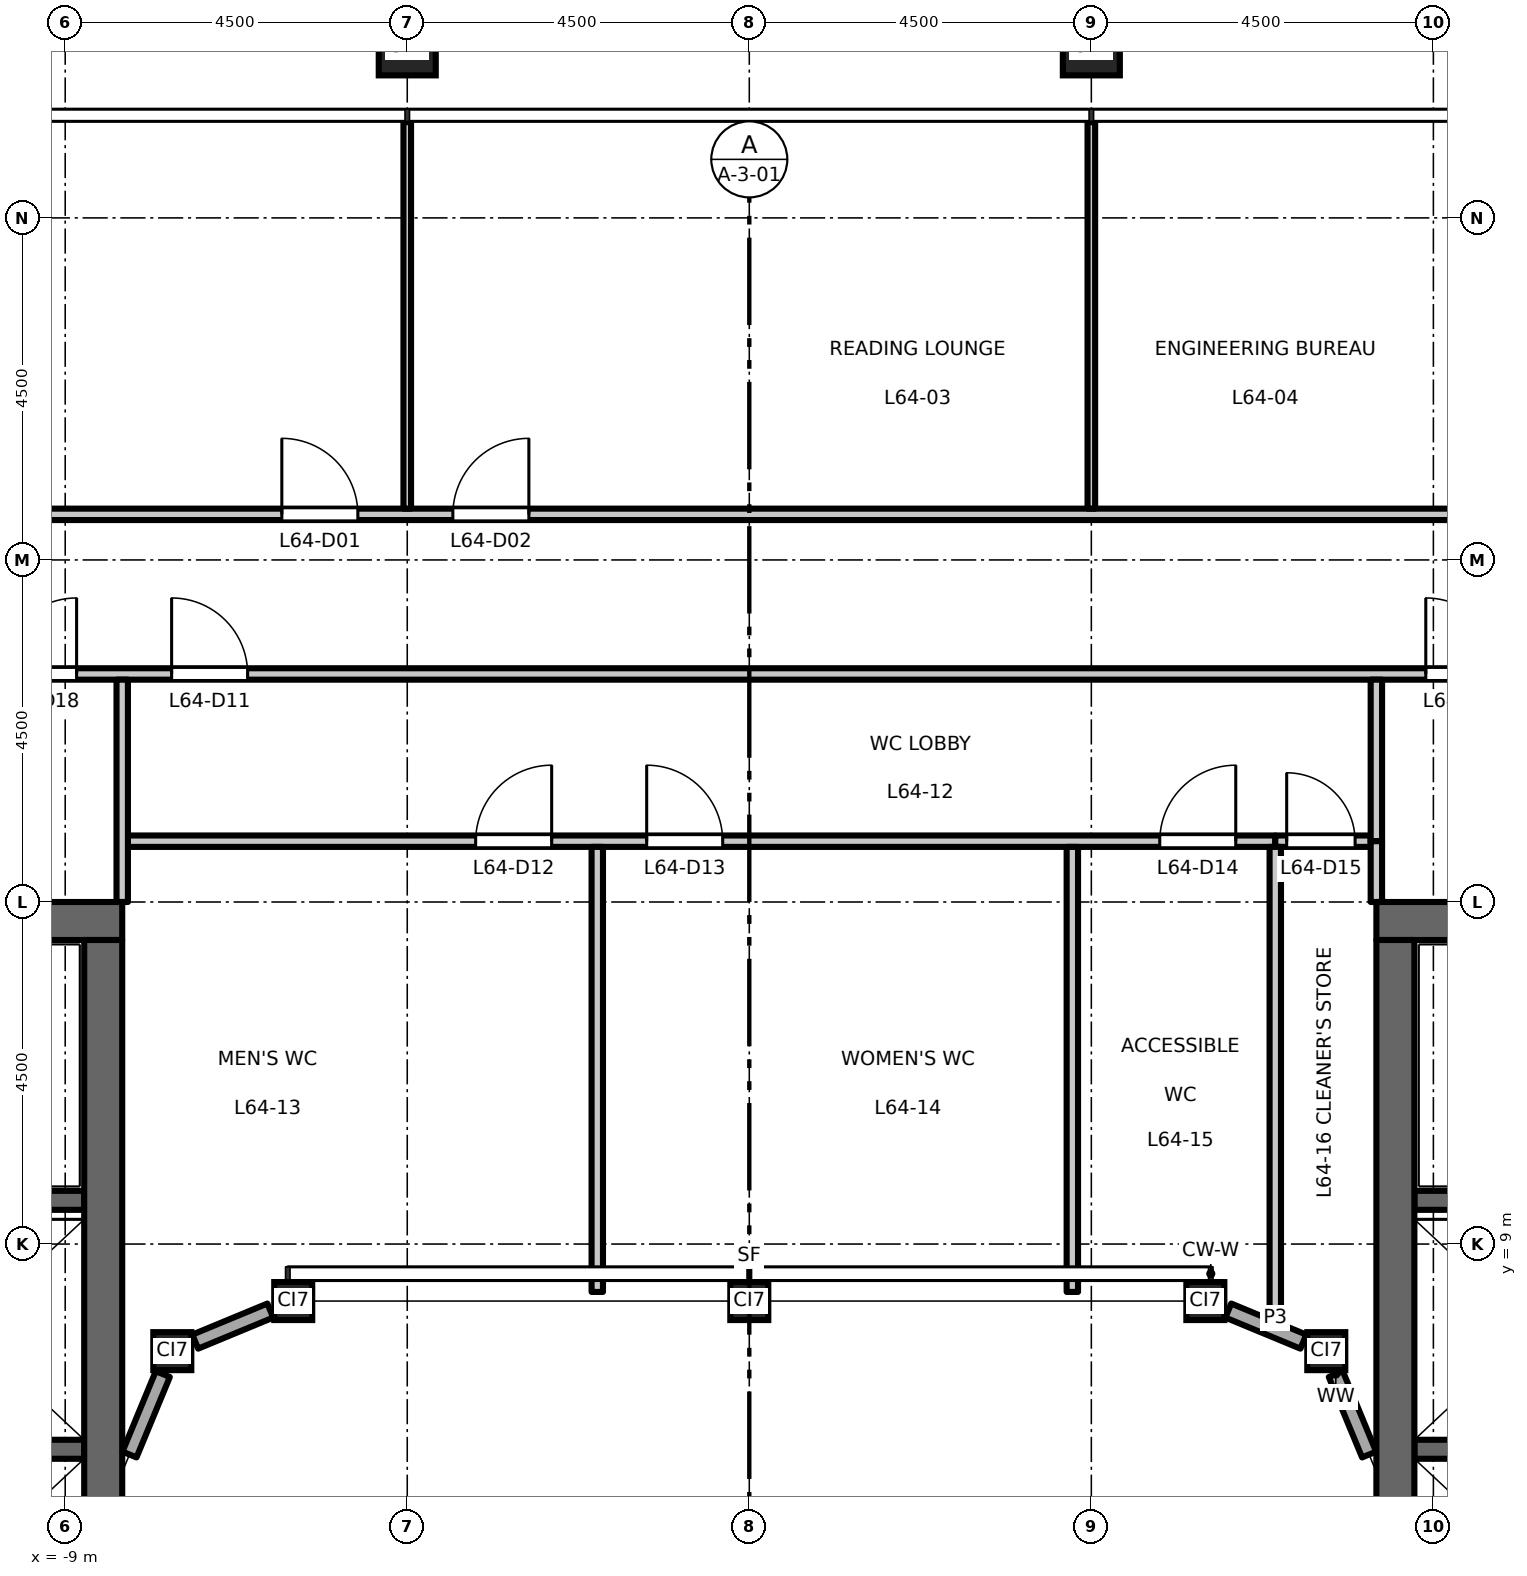
"""IFC4 building model, lengths in metres.
Left out: names, types, materials, properties, quantities, classifications, styles, units other than length and angle.
Written with IfcOpenShell. Run it as: python <this file> out.ifc"""

import sys

from ifc_helpers import new_model, si_unit, direction, frame, frame_2d, origin, origin_2d, place, context, subcontext, project, spatial, rectangle, hollow_rectangle, extrude, element, fill, save


model = new_model("IFC4")
c1 = context("Model", 3, precision=1e-05, world=origin(), true_north=direction((0.0, 1.0)))
c2 = subcontext(c1, "Body", "Model", "MODEL_VIEW")
j1 = project(units=[si_unit("LENGTHUNIT", "METRE"), si_unit("PLANEANGLEUNIT", "RADIAN")], contexts=[c1])
p1 = place(None, origin())
s1 = spatial("IfcSite", under=j1, at=p1, CompositionType="ELEMENT")
p2 = place(p1, origin())
s2 = spatial("IfcBuilding", under=s1, at=p2, CompositionType="ELEMENT")
p3 = place(p2, frame((0.0, 0.0, 298.7)))
s3 = spatial("IfcBuildingStorey", under=s2, at=p3, CompositionType="ELEMENT", Elevation=298.7)
for number, where, z_axis, x_axis in (
    (1, (4.5, 24.75, 0.0), (0.0, 0.0, 1.0), (1.0, 0.0, 0.0)),
    (2, (-4.5, 24.75, 0.0), (0.0, 0.0, 1.0), (1.0, 0.0, 0.0)),
):
    element("IfcColumn", number, at=place(p3, frame(where, z_axis=z_axis, x_axis=x_axis)), inside=s3, PredefinedType="COLUMN", context=c2, shape_type="SweptSolid", body=[
        extrude(hollow_rectangle(XDim=0.75, YDim=0.75, WallThickness=0.04, at=origin_2d()), origin(), (0.0, 0.0, 1.0), 4.5),
    ])
for number, where, z_axis, x_axis in (
    (3, (-7.591, 7.591, 0.0), (0.0, 0.0, 1.0), (1.0, 0.0, 0.0)),
    (4, (-6.0, 8.25, 0.0), (0.0, 0.0, 1.0), (1.0, 0.0, 0.0)),
    (5, (0.0, 8.25, 0.0), (0.0, 0.0, 1.0), (1.0, 0.0, 0.0)),
    (6, (6.0, 8.25, 0.0), (0.0, 0.0, 1.0), (1.0, 0.0, 0.0)),
    (7, (7.591, 7.591, 0.0), (0.0, 0.0, 1.0), (1.0, 0.0, 0.0)),
):
    element("IfcColumn", number, at=place(p3, frame(where, z_axis=z_axis, x_axis=x_axis)), inside=s3, PredefinedType="COLUMN", context=c2, shape_type="SweptSolid", body=[
        extrude(hollow_rectangle(XDim=0.5, YDim=0.5, WallThickness=0.025, at=origin_2d()), origin(), (0.0, 0.0, 1.0), 4.5),
    ])
p4 = place(p3, frame((-8.75, 6.3, 0.0), z_axis=(0.0, 0.0, 1.0), x_axis=(-1.0, 0.0, 0.0)))
e8 = element("IfcWall", 8, at=p4, inside=s3, PredefinedType="SHEAR", context=c2, shape_type="SweptSolid", body=[
    extrude(rectangle(XDim=3.1, YDim=0.25, at=frame_2d((1.55, 0.0))), origin(), (0.0, 0.0, 1.0), 4.35),
])
p5 = place(p3, frame((-8.75, 9.575, 0.0), z_axis=(0.0, 0.0, 1.0), x_axis=(-1.0, 0.0, 0.0)))
e9 = element("IfcWall", 9, at=p5, inside=s3, PredefinedType="SHEAR", context=c2, shape_type="SweptSolid", body=[
    extrude(rectangle(XDim=8.0, YDim=0.25, at=frame_2d((4.0, 0.0))), origin(), (0.0, 0.0, 1.0), 4.35),
])
p6 = place(p5, frame((6.65, 0.0, 0.0)))
e10 = element("IfcOpeningElement", 10, at=p6, cuts=e9, PredefinedType="OPENING", context=c2, shape_type="SweptSolid", body=[
    extrude(rectangle(XDim=1.1, YDim=2.1, at=frame_2d((0.55, 1.05))), frame((0.0, 0.135, 0.0), z_axis=(0.0, -1.0, 0.0), x_axis=(1.0, 0.0, 0.0)), (0.0, 0.0, 1.0), 0.27),
])
p7 = place(p3, frame((-8.25, 13.25, 0.0), z_axis=(0.0, 0.0, 1.0), x_axis=(-1.0, 0.0, 0.0)))
e11 = element("IfcWall", 11, at=p7, inside=s3, PredefinedType="SHEAR", context=c2, shape_type="SweptSolid", body=[
    extrude(rectangle(XDim=9.0, YDim=0.5, at=frame_2d((4.5, 0.0))), origin(), (0.0, 0.0, 1.0), 4.35),
])
p8 = place(p3, frame((-8.5, -13.0, 0.0), z_axis=(0.0, 0.0, 1.0), x_axis=(0.0, 1.0, 0.0)))
e12 = element("IfcWall", 12, at=p8, inside=s3, PredefinedType="SHEAR", context=c2, shape_type="SweptSolid", body=[
    extrude(rectangle(XDim=26.0, YDim=0.5, at=frame_2d((13.0, 0.0))), origin(), (0.0, 0.0, 1.0), 4.35),
])
p9 = place(p3, frame((8.75, 6.3, 0.0), z_axis=(0.0, 0.0, 1.0), x_axis=(1.0, 0.0, 0.0)))
e13 = element("IfcWall", 13, at=p9, inside=s3, PredefinedType="SHEAR", context=c2, shape_type="SweptSolid", body=[
    extrude(rectangle(XDim=3.1, YDim=0.25, at=frame_2d((1.55, 0.0))), origin(), (0.0, 0.0, 1.0), 4.35),
])
p10 = place(p3, frame((8.75, 9.575, 0.0), z_axis=(0.0, 0.0, 1.0), x_axis=(1.0, 0.0, 0.0)))
e14 = element("IfcWall", 14, at=p10, inside=s3, PredefinedType="SHEAR", context=c2, shape_type="SweptSolid", body=[
    extrude(rectangle(XDim=8.0, YDim=0.25, at=frame_2d((4.0, 0.0))), origin(), (0.0, 0.0, 1.0), 4.35),
])
p11 = place(p10, frame((6.65, 0.0, 0.0)))
e15 = element("IfcOpeningElement", 15, at=p11, cuts=e14, PredefinedType="OPENING", context=c2, shape_type="SweptSolid", body=[
    extrude(rectangle(XDim=1.1, YDim=2.1, at=frame_2d((0.55, 1.05))), frame((0.0, 0.135, 0.0), z_axis=(0.0, -1.0, 0.0), x_axis=(1.0, 0.0, 0.0)), (0.0, 0.0, 1.0), 0.27),
])
p12 = place(p3, frame((8.25, 13.25, 0.0), z_axis=(0.0, 0.0, 1.0), x_axis=(1.0, 0.0, 0.0)))
e16 = element("IfcWall", 16, at=p12, inside=s3, PredefinedType="SHEAR", context=c2, shape_type="SweptSolid", body=[
    extrude(rectangle(XDim=9.0, YDim=0.5, at=frame_2d((4.5, 0.0))), origin(), (0.0, 0.0, 1.0), 4.35),
])
p13 = place(p3, frame((8.5, -13.0, 0.0), z_axis=(0.0, 0.0, 1.0), x_axis=(0.0, 1.0, 0.0)))
e17 = element("IfcWall", 17, at=p13, inside=s3, PredefinedType="SHEAR", context=c2, shape_type="SweptSolid", body=[
    extrude(rectangle(XDim=26.0, YDim=0.5, at=frame_2d((13.0, 0.0))), origin(), (0.0, 0.0, 1.0), 4.35),
])
p14 = place(p3, frame((8.154, 6.231, 0.0), z_axis=(0.0, 0.0, 1.0), x_axis=(-0.382571404949, 0.923925927829, 0.0)))
e18 = element("IfcWall", 18, at=p14, inside=s3, PredefinedType="STANDARD", context=c2, shape_type="SweptSolid", body=[
    extrude(rectangle(XDim=1.146, YDim=0.2, at=frame_2d((0.573, 0.0))), origin(), (0.0, 0.0, 1.0), 4.01),
])
for number, where, z_axis, x_axis in (
    (19, (7.289, 7.716, 0.0), (0.0, 0.0, 1.0), (-0.924, 0.383, 0.0)),
    (20, (-6.302, 8.125, 0.0), (0.0, 0.0, 1.0), (-0.924, -0.383, 0.0)),
):
    element("IfcWall", number, at=place(p3, frame(where, z_axis=z_axis, x_axis=x_axis)), inside=s3, PredefinedType="STANDARD", context=c2, shape_type="SweptSolid", body=[
        extrude(rectangle(XDim=1.069, YDim=0.2, at=frame_2d((0.534, 0.0))), origin(), (0.0, 0.0, 1.0), 4.01),
    ])
p15 = place(p3, frame((-7.716, 7.289, 0.0), z_axis=(0.0, 0.0, 1.0), x_axis=(-0.382571404949, -0.923925927829, 0.0)))
e21 = element("IfcWall", 21, at=p15, inside=s3, PredefinedType="STANDARD", context=c2, shape_type="SweptSolid", body=[
    extrude(rectangle(XDim=1.146, YDim=0.2, at=frame_2d((0.573, 0.0))), origin(), (0.0, 0.0, 1.0), 4.01),
])
p16 = place(p3, frame((-8.175, 14.3, 0.0), z_axis=(0.0, 0.0, 1.0), x_axis=(1.0, 0.0, 0.0)))
e22 = element("IfcWall", 22, at=p16, inside=s3, PredefinedType="PARTITIONING", context=c2, shape_type="SweptSolid", body=[
    extrude(rectangle(XDim=15.095, YDim=0.15, at=frame_2d((7.547, 0.0))), origin(), (0.0, 0.0, 1.0), 4.35),
])
p17 = place(p16, frame((4.575, 0.0, 0.0)))
e23 = element("IfcOpeningElement", 23, at=p17, cuts=e22, PredefinedType="OPENING", context=c2, shape_type="SweptSolid", body=[
    extrude(rectangle(XDim=1.0, YDim=2.1, at=frame_2d((0.5, 1.05))), frame((0.0, 0.085, 0.0), z_axis=(0.0, -1.0, 0.0), x_axis=(1.0, 0.0, 0.0)), (0.0, 0.0, 1.0), 0.17),
])
p18 = place(p16, frame((6.825, 0.0, 0.0)))
e24 = element("IfcOpeningElement", 24, at=p18, cuts=e22, PredefinedType="OPENING", context=c2, shape_type="SweptSolid", body=[
    extrude(rectangle(XDim=1.0, YDim=2.1, at=frame_2d((0.5, 1.05))), frame((0.0, 0.085, 0.0), z_axis=(0.0, -1.0, 0.0), x_axis=(1.0, 0.0, 0.0)), (0.0, 0.0, 1.0), 0.17),
])
p19 = place(p16, frame((13.575, 0.0, 0.0)))
e25 = element("IfcOpeningElement", 25, at=p19, cuts=e22, PredefinedType="OPENING", context=c2, shape_type="SweptSolid", body=[
    extrude(rectangle(XDim=1.0, YDim=2.1, at=frame_2d((0.5, 1.05))), frame((0.0, 0.085, 0.0), z_axis=(0.0, -1.0, 0.0), x_axis=(1.0, 0.0, 0.0)), (0.0, 0.0, 1.0), 0.17),
])
p20 = place(p3, frame((6.92, 14.3, 0.0), z_axis=(0.0, 0.0, 1.0), x_axis=(1.0, 0.0, 0.0)))
e26 = element("IfcWall", 26, at=p20, inside=s3, PredefinedType="PARTITIONING", context=c2, shape_type="SweptSolid", body=[
    extrude(rectangle(XDim=1.255, YDim=0.15, at=frame_2d((0.627, 0.0))), origin(), (0.0, 0.0, 1.0), 4.35),
])
p21 = place(p20, frame((0.15, 0.0, 0.0)))
e27 = element("IfcOpeningElement", 27, at=p21, cuts=e26, PredefinedType="OPENING", context=c2, shape_type="SweptSolid", body=[
    extrude(rectangle(XDim=0.9, YDim=2.1, at=frame_2d((0.45, 1.05))), frame((0.0, 0.085, 0.0), z_axis=(0.0, -1.0, 0.0), x_axis=(1.0, 0.0, 0.0)), (0.0, 0.0, 1.0), 0.17),
])
p22 = place(p3, frame((-17.325, 16.5, 0.0), z_axis=(0.0, 0.0, 1.0), x_axis=(1.0, 0.0, 0.0)))
e28 = element("IfcWall", 28, at=p22, inside=s3, PredefinedType="PARTITIONING", context=c2, shape_type="SweptSolid", body=[
    extrude(rectangle(XDim=34.65, YDim=0.15, at=frame_2d((17.325, 0.0))), origin(), (0.0, 0.0, 1.0), 4.35),
])
p23 = place(p22, frame((9.725, 0.0, 0.0)))
e29 = element("IfcOpeningElement", 29, at=p23, cuts=e28, PredefinedType="OPENING", context=c2, shape_type="SweptSolid", body=[
    extrude(rectangle(XDim=1.0, YDim=2.1, at=frame_2d((0.5, 1.05))), frame((0.0, 0.085, 0.0), z_axis=(0.0, -1.0, 0.0), x_axis=(1.0, 0.0, 0.0)), (0.0, 0.0, 1.0), 0.17),
])
p24 = place(p22, frame((7.475, 0.0, 0.0)))
e30 = element("IfcOpeningElement", 30, at=p24, cuts=e28, PredefinedType="OPENING", context=c2, shape_type="SweptSolid", body=[
    extrude(rectangle(XDim=1.0, YDim=2.1, at=frame_2d((0.5, 1.05))), frame((0.0, 0.085, 0.0), z_axis=(0.0, -1.0, 0.0), x_axis=(1.0, 0.0, 0.0)), (0.0, 0.0, 1.0), 0.17),
])
p25 = place(p22, frame((26.225, 0.0, 0.0)))
e31 = element("IfcOpeningElement", 31, at=p25, cuts=e28, PredefinedType="OPENING", context=c2, shape_type="SweptSolid", body=[
    extrude(rectangle(XDim=1.0, YDim=2.1, at=frame_2d((0.5, 1.05))), frame((0.0, 0.085, 0.0), z_axis=(0.0, -1.0, 0.0), x_axis=(1.0, 0.0, 0.0)), (0.0, 0.0, 1.0), 0.17),
])
p26 = place(p3, frame((-21.566, 18.6, 0.0), z_axis=(0.0, 0.0, 1.0), x_axis=(1.0, 0.0, 0.0)))
e32 = element("IfcWall", 32, at=p26, inside=s3, PredefinedType="PARTITIONING", context=c2, shape_type="SweptSolid", body=[
    extrude(rectangle(XDim=43.132, YDim=0.15, at=frame_2d((21.566, 0.0))), origin(), (0.0, 0.0, 1.0), 4.35),
])
p27 = place(p26, frame((15.416, 0.0, 0.0)))
e33 = element("IfcOpeningElement", 33, at=p27, cuts=e32, PredefinedType="OPENING", context=c2, shape_type="SweptSolid", body=[
    extrude(rectangle(XDim=1.0, YDim=2.1, at=frame_2d((0.5, 1.05))), frame((0.0, 0.085, 0.0), z_axis=(0.0, -1.0, 0.0), x_axis=(1.0, 0.0, 0.0)), (0.0, 0.0, 1.0), 0.17),
])
p28 = place(p26, frame((17.666, 0.0, 0.0)))
e34 = element("IfcOpeningElement", 34, at=p28, cuts=e32, PredefinedType="OPENING", context=c2, shape_type="SweptSolid", body=[
    extrude(rectangle(XDim=1.0, YDim=2.1, at=frame_2d((0.5, 1.05))), frame((0.0, 0.085, 0.0), z_axis=(0.0, -1.0, 0.0), x_axis=(1.0, 0.0, 0.0)), (0.0, 0.0, 1.0), 0.17),
])
p29 = place(p26, frame((33.416, 0.0, 0.0)))
e35 = element("IfcOpeningElement", 35, at=p29, cuts=e32, PredefinedType="OPENING", context=c2, shape_type="SweptSolid", body=[
    extrude(rectangle(XDim=1.0, YDim=2.1, at=frame_2d((0.5, 1.05))), frame((0.0, 0.085, 0.0), z_axis=(0.0, -1.0, 0.0), x_axis=(1.0, 0.0, 0.0)), (0.0, 0.0, 1.0), 0.17),
])
p30 = place(p26, frame((6.416, 0.0, 0.0)))
e36 = element("IfcOpeningElement", 36, at=p30, cuts=e32, PredefinedType="OPENING", context=c2, shape_type="SweptSolid", body=[
    extrude(rectangle(XDim=1.0, YDim=2.1, at=frame_2d((0.5, 1.05))), frame((0.0, 0.085, 0.0), z_axis=(0.0, -1.0, 0.0), x_axis=(1.0, 0.0, 0.0)), (0.0, 0.0, 1.0), 0.17),
])
p31 = place(p26, frame((35.732, 0.0, 0.0)))
e37 = element("IfcOpeningElement", 37, at=p31, cuts=e32, PredefinedType="OPENING", context=c2, shape_type="SweptSolid", body=[
    extrude(rectangle(XDim=1.0, YDim=2.1, at=frame_2d((0.5, 1.05))), frame((0.0, 0.085, 0.0), z_axis=(0.0, -1.0, 0.0), x_axis=(1.0, 0.0, 0.0)), (0.0, 0.0, 1.0), 0.17),
])
p32 = place(p3, frame((-8.25, 13.5, 0.0), z_axis=(0.0, 0.0, 1.0), x_axis=(0.0, 1.0, 0.0)))
e38 = element("IfcWall", 38, at=p32, inside=s3, PredefinedType="PARTITIONING", context=c2, shape_type="SweptSolid", body=[
    extrude(rectangle(XDim=2.925, YDim=0.15, at=frame_2d((1.462, 0.0))), origin(), (0.0, 0.0, 1.0), 4.35),
])
p33 = place(p3, frame((-4.5, 18.675, 0.0), z_axis=(0.0, 0.0, 1.0), x_axis=(0.0, 1.0, 0.0)))
e39 = element("IfcWall", 39, at=p33, inside=s3, PredefinedType="PARTITIONING", context=c2, shape_type="SweptSolid", body=[
    extrude(rectangle(XDim=5.085, YDim=0.1, at=frame_2d((2.542, 0.0))), origin(), (0.0, 0.0, 1.0), 3.65),
])
for number, where, z_axis, x_axis in (
    (40, (-2.0, 8.37, 0.0), (0.0, 0.0, 1.0), (0.0, 1.0, 0.0)),
    (41, (4.25, 8.37, 0.0), (0.0, 0.0, 1.0), (0.0, 1.0, 0.0)),
):
    element("IfcWall", number, at=place(p3, frame(where, z_axis=z_axis, x_axis=x_axis)), inside=s3, PredefinedType="PARTITIONING", context=c2, shape_type="SweptSolid", body=[
        extrude(rectangle(XDim=5.855, YDim=0.15, at=frame_2d((2.927, 0.0))), origin(), (0.0, 0.0, 1.0), 4.35),
    ])
p34 = place(p3, frame((4.5, 18.675, 0.0), z_axis=(0.0, 0.0, 1.0), x_axis=(0.0, 1.0, 0.0)))
e42 = element("IfcWall", 42, at=p34, inside=s3, PredefinedType="PARTITIONING", context=c2, shape_type="SweptSolid", body=[
    extrude(rectangle(XDim=5.085, YDim=0.1, at=frame_2d((2.542, 0.0))), origin(), (0.0, 0.0, 1.0), 3.65),
])
p35 = place(p3, frame((6.92, 8.029, 0.0), z_axis=(0.0, 0.0, 1.0), x_axis=(0.0, 1.0, 0.0)))
e43 = element("IfcWall", 43, at=p35, inside=s3, PredefinedType="PARTITIONING", context=c2, shape_type="SweptSolid", body=[
    extrude(rectangle(XDim=6.196, YDim=0.15, at=frame_2d((3.098, 0.0))), origin(), (0.0, 0.0, 1.0), 4.35),
])
p36 = place(p3, frame((8.25, 14.3, 0.0), z_axis=(0.0, 0.0, 1.0), x_axis=(0.0, 1.0, 0.0)))
e44 = element("IfcWall", 44, at=p36, inside=s3, PredefinedType="PARTITIONING", context=c2, shape_type="SweptSolid", body=[
    extrude(rectangle(XDim=2.125, YDim=0.15, at=frame_2d((1.062, 0.0))), origin(), (0.0, 0.0, 1.0), 4.35),
])
p37 = place(p3, frame((8.25, 13.5, 0.0), z_axis=(0.0, 0.0, 1.0), x_axis=(0.0, 1.0, 0.0)))
e45 = element("IfcWall", 45, at=p37, inside=s3, PredefinedType="PARTITIONING", context=c2, shape_type="SweptSolid", body=[
    extrude(rectangle(XDim=0.8, YDim=0.15, at=frame_2d((0.4, 0.0))), origin(), (0.0, 0.0, 1.0), 4.35),
])
p38 = place(p27, origin())
e46 = element("IfcDoor", 46, at=p38, inside=s3, OperationType="SINGLE_SWING_LEFT", PredefinedType="DOOR", context=c2, shape_type="SweptSolid", body=[
    extrude(rectangle(XDim=1.0, YDim=2.1, at=frame_2d((0.5, 1.05))), frame((0.0, 0.025, 0.0), z_axis=(0.0, -1.0, 0.0), x_axis=(1.0, 0.0, 0.0)), (0.0, 0.0, 1.0), 0.05),
])
fill(e33, e46)
p39 = place(p28, origin())
e47 = element("IfcDoor", 47, at=p39, inside=s3, OperationType="SINGLE_SWING_RIGHT", PredefinedType="DOOR", context=c2, shape_type="SweptSolid", body=[
    extrude(rectangle(XDim=1.0, YDim=2.1, at=frame_2d((0.5, 1.05))), frame((0.0, 0.025, 0.0), z_axis=(0.0, -1.0, 0.0), x_axis=(1.0, 0.0, 0.0)), (0.0, 0.0, 1.0), 0.05),
])
fill(e34, e47)
p40 = place(p23, origin())
e48 = element("IfcDoor", 48, at=p40, inside=s3, OperationType="SINGLE_SWING_LEFT", PredefinedType="DOOR", context=c2, shape_type="SweptSolid", body=[
    extrude(rectangle(XDim=1.0, YDim=2.1, at=frame_2d((0.5, 1.05))), frame((0.0, 0.025, 0.0), z_axis=(0.0, -1.0, 0.0), x_axis=(1.0, 0.0, 0.0)), (0.0, 0.0, 1.0), 0.05),
])
fill(e29, e48)
p41 = place(p17, origin())
e49 = element("IfcDoor", 49, at=p41, inside=s3, OperationType="SINGLE_SWING_RIGHT", PredefinedType="DOOR", context=c2, shape_type="SweptSolid", body=[
    extrude(rectangle(XDim=1.0, YDim=2.1, at=frame_2d((0.5, 1.05))), frame((0.0, 0.025, 0.0), z_axis=(0.0, -1.0, 0.0), x_axis=(1.0, 0.0, 0.0)), (0.0, 0.0, 1.0), 0.05),
])
fill(e23, e49)
p42 = place(p18, origin())
e50 = element("IfcDoor", 50, at=p42, inside=s3, OperationType="SINGLE_SWING_LEFT", PredefinedType="DOOR", context=c2, shape_type="SweptSolid", body=[
    extrude(rectangle(XDim=1.0, YDim=2.1, at=frame_2d((0.5, 1.05))), frame((0.0, 0.025, 0.0), z_axis=(0.0, -1.0, 0.0), x_axis=(1.0, 0.0, 0.0)), (0.0, 0.0, 1.0), 0.05),
])
fill(e24, e50)
p43 = place(p19, origin())
e51 = element("IfcDoor", 51, at=p43, inside=s3, OperationType="SINGLE_SWING_RIGHT", PredefinedType="DOOR", context=c2, shape_type="SweptSolid", body=[
    extrude(rectangle(XDim=1.0, YDim=2.1, at=frame_2d((0.5, 1.05))), frame((0.0, 0.025, 0.0), z_axis=(0.0, -1.0, 0.0), x_axis=(1.0, 0.0, 0.0)), (0.0, 0.0, 1.0), 0.05),
])
fill(e25, e51)
p44 = place(p21, origin())
e52 = element("IfcDoor", 52, at=p44, inside=s3, OperationType="SINGLE_SWING_LEFT", PredefinedType="DOOR", context=c2, shape_type="SweptSolid", body=[
    extrude(rectangle(XDim=0.9, YDim=2.1, at=frame_2d((0.45, 1.05))), frame((0.0, 0.025, 0.0), z_axis=(0.0, -1.0, 0.0), x_axis=(1.0, 0.0, 0.0)), (0.0, 0.0, 1.0), 0.05),
])
fill(e27, e52)
p45 = place(p24, origin())
e53 = element("IfcDoor", 53, at=p45, inside=s3, OperationType="SINGLE_SWING_RIGHT", PredefinedType="DOOR", context=c2, shape_type="SweptSolid", body=[
    extrude(rectangle(XDim=1.0, YDim=2.1, at=frame_2d((0.5, 1.05))), frame((0.0, 0.025, 0.0), z_axis=(0.0, -1.0, 0.0), x_axis=(1.0, 0.0, 0.0)), (0.0, 0.0, 1.0), 0.05),
])
fill(e30, e53)
p46 = place(p25, origin())
e54 = element("IfcDoor", 54, at=p46, inside=s3, OperationType="SINGLE_SWING_LEFT", PredefinedType="DOOR", context=c2, shape_type="SweptSolid", body=[
    extrude(rectangle(XDim=1.0, YDim=2.1, at=frame_2d((0.5, 1.05))), frame((0.0, 0.025, 0.0), z_axis=(0.0, -1.0, 0.0), x_axis=(1.0, 0.0, 0.0)), (0.0, 0.0, 1.0), 0.05),
])
fill(e31, e54)
save(model, sys.argv[1])
